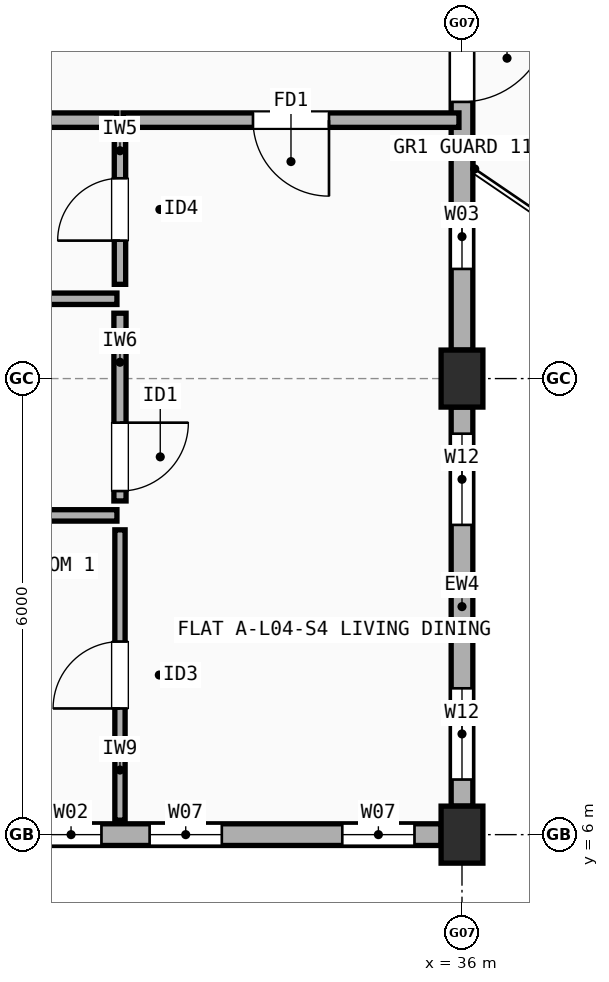
"""IFC4 building model, lengths in metres.
Left out: names, types, materials, properties, quantities, classifications, styles, units other than length and angle.
Written with IfcOpenShell. Run it as: python <this file> out.ifc"""

import sys

from ifc_helpers import new_model, si_unit, direction, frame, frame_2d, origin, origin_2d, place, context, subcontext, project, spatial, rectangle, extrude, element, fill, save


model = new_model("IFC4")
c1 = context("Model", 3, precision=1e-05, world=origin(), true_north=direction((0.0, 1.0)))
c2 = subcontext(c1, "Body", "Model", "MODEL_VIEW")
j1 = project(units=[si_unit("LENGTHUNIT", "METRE"), si_unit("PLANEANGLEUNIT", "RADIAN")], contexts=[c1])
p1 = place(None, origin())
s1 = spatial("IfcSite", under=j1, at=p1, CompositionType="ELEMENT")
p2 = place(p1, origin())
s2 = spatial("IfcBuilding", under=s1, at=p2, CompositionType="ELEMENT")
p3 = place(p2, frame((0.0, 0.0, 14.1)))
s3 = spatial("IfcBuildingStorey", under=s2, at=p3, CompositionType="ELEMENT", Elevation=14.1)
for number, where, z_axis, x_axis in (
    (1, (36.0, 6.0, 0.0), (0.0, 0.0, 1.0), (1.0, 0.0, 0.0)),
    (2, (36.0, 12.0, 0.0), (0.0, 0.0, 1.0), (1.0, 0.0, 0.0)),
):
    element("IfcColumn", number, at=place(p3, frame(where, z_axis=z_axis, x_axis=x_axis)), inside=s3, PredefinedType="COLUMN", context=c2, shape_type="SweptSolid", body=[
        extrude(rectangle(XDim=0.55, YDim=0.75, at=origin_2d()), origin(), (0.0, 0.0, 1.0), 2.95),
    ])
p4 = place(p3, frame((30.275, 6.0, 0.0), z_axis=(0.0, 0.0, 1.0), x_axis=(1.0, 0.0, 0.0)))
e3 = element("IfcWall", 3, at=p4, inside=s3, PredefinedType="STANDARD", context=c2, shape_type="SweptSolid", body=[
    extrude(rectangle(XDim=5.45, YDim=0.285, at=frame_2d((2.725, 0.0))), origin(), (0.0, 0.0, 1.0), 2.432),
])
p5 = place(p4, frame((1.615, 0.0, 0.9)))
e4 = element("IfcOpeningElement", 4, at=p5, cuts=e3, PredefinedType="OPENING", context=c2, shape_type="SweptSolid", body=[
    extrude(rectangle(XDim=0.95, YDim=1.35, at=frame_2d((0.475, 0.675))), frame((0.0, 0.152, 0.0), z_axis=(0.0, -1.0, 0.0), x_axis=(1.0, 0.0, 0.0)), (0.0, 0.0, 1.0), 0.305),
])
p6 = place(p4, frame((4.15, 0.0, 0.9)))
e5 = element("IfcOpeningElement", 5, at=p6, cuts=e3, PredefinedType="OPENING", context=c2, shape_type="SweptSolid", body=[
    extrude(rectangle(XDim=0.95, YDim=1.35, at=frame_2d((0.475, 0.675))), frame((0.0, 0.152, 0.0), z_axis=(0.0, -1.0, 0.0), x_axis=(1.0, 0.0, 0.0)), (0.0, 0.0, 1.0), 0.305),
])
p7 = place(p4, frame((0.181, 0.0, 0.9)))
e6 = element("IfcOpeningElement", 6, at=p7, cuts=e3, PredefinedType="OPENING", context=c2, shape_type="SweptSolid", body=[
    extrude(rectangle(XDim=0.8, YDim=1.2, at=frame_2d((0.4, 0.6))), frame((0.0, 0.152, 0.0), z_axis=(0.0, -1.0, 0.0), x_axis=(1.0, 0.0, 0.0)), (0.0, 0.0, 1.0), 0.305),
])
p8 = place(p3, frame((36.0, 6.375, 0.0), z_axis=(0.0, 0.0, 1.0), x_axis=(0.0, 1.0, 0.0)))
e7 = element("IfcWall", 7, at=p8, inside=s3, PredefinedType="STANDARD", context=c2, shape_type="SweptSolid", body=[
    extrude(rectangle(XDim=5.25, YDim=0.285, at=frame_2d((2.625, 0.0))), origin(), (0.0, 0.0, 1.0), 2.432),
])
p9 = place(p8, frame((0.35, 0.0, 0.9)))
e8 = element("IfcOpeningElement", 8, at=p9, cuts=e7, PredefinedType="OPENING", context=c2, shape_type="SweptSolid", body=[
    extrude(rectangle(XDim=1.2, YDim=1.35, at=frame_2d((0.6, 0.675))), frame((0.0, 0.152, 0.0), z_axis=(0.0, -1.0, 0.0), x_axis=(1.0, 0.0, 0.0)), (0.0, 0.0, 1.0), 0.305),
])
p10 = place(p8, frame((3.7, 0.0, 0.9)))
e9 = element("IfcOpeningElement", 9, at=p10, cuts=e7, PredefinedType="OPENING", context=c2, shape_type="SweptSolid", body=[
    extrude(rectangle(XDim=1.2, YDim=1.35, at=frame_2d((0.6, 0.675))), frame((0.0, 0.152, 0.0), z_axis=(0.0, -1.0, 0.0), x_axis=(1.0, 0.0, 0.0)), (0.0, 0.0, 1.0), 0.305),
])
p11 = place(p3, frame((36.0, 12.375, 0.0), z_axis=(0.0, 0.0, 1.0), x_axis=(0.0, 1.0, 0.0)))
e10 = element("IfcWall", 10, at=p11, inside=s3, PredefinedType="STANDARD", context=c2, shape_type="SweptSolid", body=[
    extrude(rectangle(XDim=5.25, YDim=0.285, at=frame_2d((2.625, 0.0))), origin(), (0.0, 0.0, 1.0), 2.432),
])
p12 = place(p11, frame((3.265, 0.0, 0.0)))
e11 = element("IfcOpeningElement", 11, at=p12, cuts=e10, PredefinedType="OPENING", context=c2, shape_type="SweptSolid", body=[
    extrude(rectangle(XDim=1.15, YDim=2.15, at=frame_2d((0.575, 1.075))), frame((0.0, 0.152, 0.0), z_axis=(0.0, -1.0, 0.0), x_axis=(1.0, 0.0, 0.0)), (0.0, 0.0, 1.0), 0.305),
])
p13 = place(p11, frame((1.067, 0.0, 0.9)))
e12 = element("IfcOpeningElement", 12, at=p13, cuts=e10, PredefinedType="OPENING", context=c2, shape_type="SweptSolid", body=[
    extrude(rectangle(XDim=0.85, YDim=1.25, at=frame_2d((0.425, 0.625))), frame((0.0, 0.152, 0.0), z_axis=(0.0, -1.0, 0.0), x_axis=(1.0, 0.0, 0.0)), (0.0, 0.0, 1.0), 0.305),
])
p14 = place(p3, frame((28.54, 15.4, 0.0), z_axis=(0.0, 0.0, 1.0), x_axis=(1.0, 0.0, 0.0)))
e13 = element("IfcWall", 13, at=p14, inside=s3, PredefinedType="SOLIDWALL", context=c2, shape_type="SweptSolid", body=[
    extrude(rectangle(XDim=2.92, YDim=0.19, at=frame_2d((1.46, 0.0))), origin(), (0.0, 0.0, 1.0), 2.432),
])
p15 = place(p3, frame((31.54, 15.4, 0.0), z_axis=(0.0, 0.0, 1.0), x_axis=(1.0, 0.0, 0.0)))
e14 = element("IfcWall", 14, at=p15, inside=s3, PredefinedType="SOLIDWALL", context=c2, shape_type="SweptSolid", body=[
    extrude(rectangle(XDim=4.42, YDim=0.19, at=frame_2d((2.21, 0.0))), origin(), (0.0, 0.0, 1.0), 2.432),
])
p16 = place(p15, frame((1.71, 0.0, 0.0)))
e15 = element("IfcOpeningElement", 15, at=p16, cuts=e14, PredefinedType="OPENING", context=c2, shape_type="SweptSolid", body=[
    extrude(rectangle(XDim=1.0, YDim=2.15, at=frame_2d((0.5, 1.075))), frame((0.0, 0.105, 0.0), z_axis=(0.0, -1.0, 0.0), x_axis=(1.0, 0.0, 0.0)), (0.0, 0.0, 1.0), 0.21),
])
p17 = place(p3, frame((31.5, 6.19, 0.0), z_axis=(0.0, 0.0, 1.0), x_axis=(0.0, 1.0, 0.0)))
e16 = element("IfcWall", 16, at=p17, inside=s3, PredefinedType="PARTITIONING", context=c2, shape_type="SweptSolid", body=[
    extrude(rectangle(XDim=3.82, YDim=0.135, at=frame_2d((1.91, 0.0))), origin(), (0.0, 0.0, 1.0), 2.95),
])
p18 = place(p17, frame((1.47, 0.0, 0.0)))
e17 = element("IfcOpeningElement", 17, at=p18, cuts=e16, PredefinedType="OPENING", context=c2, shape_type="SweptSolid", body=[
    extrude(rectangle(XDim=0.88, YDim=2.1, at=frame_2d((0.44, 1.05))), frame((0.0, 0.077, 0.0), z_axis=(0.0, -1.0, 0.0), x_axis=(1.0, 0.0, 0.0)), (0.0, 0.0, 1.0), 0.155),
])
p19 = place(p3, frame((31.5, 10.39, 0.0), z_axis=(0.0, 0.0, 1.0), x_axis=(0.0, 1.0, 0.0)))
e18 = element("IfcWall", 18, at=p19, inside=s3, PredefinedType="PLUMBINGWALL", context=c2, shape_type="SweptSolid", body=[
    extrude(rectangle(XDim=2.47, YDim=0.16, at=frame_2d((1.235, 0.0))), origin(), (0.0, 0.0, 1.0), 2.508),
])
p20 = place(p19, frame((0.13, 0.0, 0.0)))
e19 = element("IfcOpeningElement", 19, at=p20, cuts=e18, PredefinedType="OPENING", context=c2, shape_type="SweptSolid", body=[
    extrude(rectangle(XDim=0.9, YDim=2.1, at=frame_2d((0.45, 1.05))), frame((0.0, 0.09, 0.0), z_axis=(0.0, -1.0, 0.0), x_axis=(1.0, 0.0, 0.0)), (0.0, 0.0, 1.0), 0.18),
])
p21 = place(p3, frame((31.5, 13.24, 0.0), z_axis=(0.0, 0.0, 1.0), x_axis=(0.0, 1.0, 0.0)))
e20 = element("IfcWall", 20, at=p21, inside=s3, PredefinedType="PARTITIONING", context=c2, shape_type="SweptSolid", body=[
    extrude(rectangle(XDim=1.97, YDim=0.15, at=frame_2d((0.985, 0.0))), origin(), (0.0, 0.0, 1.0), 2.95),
])
p22 = place(p21, frame((0.575, 0.0, 0.0)))
e21 = element("IfcOpeningElement", 21, at=p22, cuts=e20, PredefinedType="OPENING", context=c2, shape_type="SweptSolid", body=[
    extrude(rectangle(XDim=0.82, YDim=2.08, at=frame_2d((0.41, 1.04))), frame((0.0, 0.085, 0.0), z_axis=(0.0, -1.0, 0.0), x_axis=(1.0, 0.0, 0.0)), (0.0, 0.0, 1.0), 0.17),
])
for number, where, z_axis, x_axis in (
    (22, (28.54, 10.2, 0.0), (0.0, 0.0, 1.0), (1.0, 0.0, 0.0)),
    (23, (28.54, 13.05, 0.0), (0.0, 0.0, 1.0), (1.0, 0.0, 0.0)),
):
    element("IfcWall", number, at=place(p3, frame(where, z_axis=z_axis, x_axis=x_axis)), inside=s3, PredefinedType="PARTITIONING", context=c2, shape_type="SweptSolid", body=[
        extrude(rectangle(XDim=2.92, YDim=0.15, at=frame_2d((1.46, 0.0))), origin(), (0.0, 0.0, 1.0), 2.432),
    ])
p23 = place(p5, origin())
e24 = element("IfcWindow", 24, at=p23, inside=s3, PartitioningType="SINGLE_PANEL", PredefinedType="WINDOW", context=c2, shape_type="SweptSolid", body=[
    extrude(rectangle(XDim=0.95, YDim=1.35, at=frame_2d((0.475, 0.675))), frame((0.0, 0.03, 0.0), z_axis=(0.0, -1.0, 0.0), x_axis=(1.0, 0.0, 0.0)), (0.0, 0.0, 1.0), 0.06),
])
fill(e4, e24)
p24 = place(p6, origin())
e25 = element("IfcWindow", 25, at=p24, inside=s3, PartitioningType="SINGLE_PANEL", PredefinedType="WINDOW", context=c2, shape_type="SweptSolid", body=[
    extrude(rectangle(XDim=0.95, YDim=1.35, at=frame_2d((0.475, 0.675))), frame((0.0, 0.03, 0.0), z_axis=(0.0, -1.0, 0.0), x_axis=(1.0, 0.0, 0.0)), (0.0, 0.0, 1.0), 0.06),
])
fill(e5, e25)
p25 = place(p9, origin())
e26 = element("IfcWindow", 26, at=p25, inside=s3, PartitioningType="SINGLE_PANEL", PredefinedType="WINDOW", context=c2, shape_type="SweptSolid", body=[
    extrude(rectangle(XDim=1.2, YDim=1.35, at=frame_2d((0.6, 0.675))), frame((0.0, 0.03, 0.0), z_axis=(0.0, -1.0, 0.0), x_axis=(1.0, 0.0, 0.0)), (0.0, 0.0, 1.0), 0.06),
])
fill(e8, e26)
p26 = place(p10, origin())
e27 = element("IfcWindow", 27, at=p26, inside=s3, PartitioningType="SINGLE_PANEL", PredefinedType="WINDOW", context=c2, shape_type="SweptSolid", body=[
    extrude(rectangle(XDim=1.2, YDim=1.35, at=frame_2d((0.6, 0.675))), frame((0.0, 0.03, 0.0), z_axis=(0.0, -1.0, 0.0), x_axis=(1.0, 0.0, 0.0)), (0.0, 0.0, 1.0), 0.06),
])
fill(e9, e27)
p27 = place(p12, frame((1.15, 0.0, 0.0), z_axis=(0.0, 0.0, 1.0), x_axis=(-1.0, 0.0, 0.0)))
e28 = element("IfcDoor", 28, at=p27, inside=s3, OperationType="SINGLE_SWING_RIGHT", PredefinedType="DOOR", context=c2, shape_type="SweptSolid", body=[
    extrude(rectangle(XDim=1.15, YDim=2.15, at=frame_2d((0.575, 1.075))), frame((0.0, 0.025, 0.0), z_axis=(0.0, -1.0, 0.0), x_axis=(1.0, 0.0, 0.0)), (0.0, 0.0, 1.0), 0.05),
])
fill(e11, e28)
p28 = place(p13, origin())
e29 = element("IfcWindow", 29, at=p28, inside=s3, PartitioningType="SINGLE_PANEL", PredefinedType="WINDOW", context=c2, shape_type="SweptSolid", body=[
    extrude(rectangle(XDim=0.85, YDim=1.25, at=frame_2d((0.425, 0.625))), frame((0.0, 0.03, 0.0), z_axis=(0.0, -1.0, 0.0), x_axis=(1.0, 0.0, 0.0)), (0.0, 0.0, 1.0), 0.06),
])
fill(e12, e29)
p29 = place(p7, origin())
e30 = element("IfcWindow", 30, at=p29, inside=s3, PartitioningType="SINGLE_PANEL", PredefinedType="WINDOW", context=c2, shape_type="SweptSolid", body=[
    extrude(rectangle(XDim=0.8, YDim=1.2, at=frame_2d((0.4, 0.6))), frame((0.0, 0.03, 0.0), z_axis=(0.0, -1.0, 0.0), x_axis=(1.0, 0.0, 0.0)), (0.0, 0.0, 1.0), 0.06),
])
fill(e6, e30)
p30 = place(p16, origin())
e31 = element("IfcDoor", 31, at=p30, inside=s3, OperationType="SINGLE_SWING_RIGHT", PredefinedType="DOOR", context=c2, shape_type="SweptSolid", body=[
    extrude(rectangle(XDim=1.0, YDim=2.15, at=frame_2d((0.5, 1.075))), frame((0.0, 0.025, 0.0), z_axis=(0.0, -1.0, 0.0), x_axis=(1.0, 0.0, 0.0)), (0.0, 0.0, 1.0), 0.05),
])
fill(e15, e31)
p31 = place(p18, origin())
e32 = element("IfcDoor", 32, at=p31, inside=s3, OperationType="SINGLE_SWING_LEFT", PredefinedType="DOOR", context=c2, shape_type="SweptSolid", body=[
    extrude(rectangle(XDim=0.88, YDim=2.1, at=frame_2d((0.44, 1.05))), frame((0.0, 0.025, 0.0), z_axis=(0.0, -1.0, 0.0), x_axis=(1.0, 0.0, 0.0)), (0.0, 0.0, 1.0), 0.05),
])
fill(e17, e32)
p32 = place(p20, origin())
e33 = element("IfcDoor", 33, at=p32, inside=s3, OperationType="SINGLE_SWING_RIGHT", PredefinedType="DOOR", context=c2, shape_type="SweptSolid", body=[
    extrude(rectangle(XDim=0.9, YDim=2.1, at=frame_2d((0.45, 1.05))), frame((0.0, 0.025, 0.0), z_axis=(0.0, -1.0, 0.0), x_axis=(1.0, 0.0, 0.0)), (0.0, 0.0, 1.0), 0.05),
])
fill(e19, e33)
p33 = place(p22, origin())
e34 = element("IfcDoor", 34, at=p33, inside=s3, OperationType="SINGLE_SWING_LEFT", PredefinedType="DOOR", context=c2, shape_type="SweptSolid", body=[
    extrude(rectangle(XDim=0.82, YDim=2.08, at=frame_2d((0.41, 1.04))), frame((0.0, 0.025, 0.0), z_axis=(0.0, -1.0, 0.0), x_axis=(1.0, 0.0, 0.0)), (0.0, 0.0, 1.0), 0.05),
])
fill(e21, e34)
save(model, sys.argv[1])
